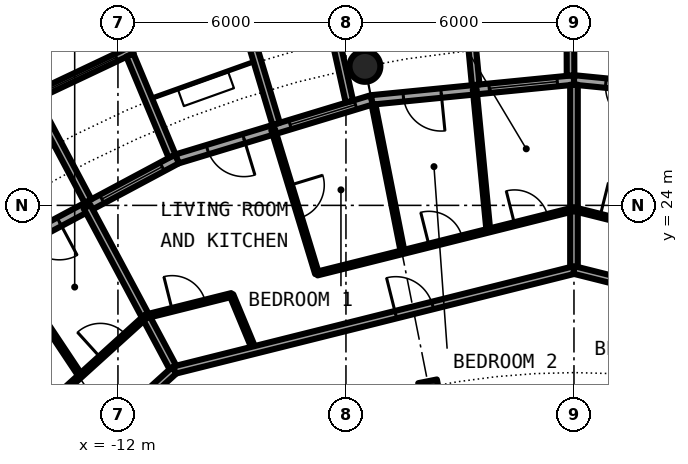
"""IFC4 building model, lengths in metres.
Left out: names, types, materials, properties, quantities, classifications, styles, units other than length and angle.
Written with IfcOpenShell. Run it as: python <this file> out.ifc"""

import sys

from ifc_helpers import new_model, si_unit, direction, frame, frame_2d, origin, origin_2d, place, context, subcontext, project, spatial, rectangle, circle, hollow_circle, i_section, extrude, element, fill, save


model = new_model("IFC4")
c1 = context("Model", 3, precision=1e-05, world=origin(), true_north=direction((0.0, 1.0)))
c2 = subcontext(c1, "Body", "Model", "MODEL_VIEW")
j1 = project(units=[si_unit("LENGTHUNIT", "METRE"), si_unit("PLANEANGLEUNIT", "RADIAN")], contexts=[c1])
p1 = place(None, origin())
s1 = spatial("IfcSite", under=j1, at=p1, CompositionType="ELEMENT")
p2 = place(p1, origin())
s2 = spatial("IfcBuilding", under=s1, at=p2, CompositionType="ELEMENT")
p3 = place(p2, frame((0.0, 0.0, 161.6)))
s3 = spatial("IfcBuildingStorey", under=s2, at=p3, CompositionType="ELEMENT", Elevation=161.6)
p4 = place(p3, frame((-5.501, 27.658, 0.0), z_axis=(0.0, 0.0, 1.0), x_axis=(1.0, 0.0, 0.0)))
e1 = element("IfcColumn", 1, at=p4, inside=s3, PredefinedType="COLUMN", context=c2, shape_type="SweptSolid", body=[
    extrude(hollow_circle(Radius=0.406, WallThickness=0.04, at=origin_2d()), origin(), (0.0, 0.0, 1.0), 3.05),
])
p5 = place(p3, frame((-3.824, 19.223, 0.0), z_axis=(0.0, 0.0, 1.0), x_axis=(-0.195090322016, 0.980785280403, 0.0)))
e2 = element("IfcColumn", 2, at=p5, inside=s3, PredefinedType="COLUMN", context=c2, shape_type="SweptSolid", body=[
    extrude(i_section(OverallWidth=0.3, OverallDepth=0.5, WebThickness=0.014, FlangeThickness=0.028, FilletRadius=0.027, at=origin_2d()), origin(), (0.0, 0.0, 1.0), 3.05),
])
p6 = place(p3, frame((5.326, 26.775, 0.0), z_axis=(0.0, 0.0, 1.0), x_axis=(-0.995173996315, 0.098126026407, 0.0)))
e3 = element("IfcWall", 3, at=p6, inside=s3, PredefinedType="SOLIDWALL", context=c2, shape_type="SweptSolid", body=[
    extrude(rectangle(XDim=5.352, YDim=0.25, at=frame_2d((2.676, 0.0))), origin(), (0.0, 0.0, 1.0), 2.7),
])
p7 = place(p6, frame((0.441, 0.0, 0.3)))
e4 = element("IfcOpeningElement", 4, at=p7, cuts=e3, PredefinedType="OPENING", context=c2, shape_type="SweptSolid", body=[
    extrude(rectangle(XDim=1.8, YDim=2.1, at=frame_2d((0.9, 1.05))), frame((0.0, 0.135, 0.0), z_axis=(0.0, -1.0, 0.0), x_axis=(1.0, 0.0, 0.0)), (0.0, 0.0, 1.0), 0.27),
])
p8 = place(p6, frame((3.51, 0.0, 0.0)))
e5 = element("IfcOpeningElement", 5, at=p8, cuts=e3, PredefinedType="OPENING", context=c2, shape_type="SweptSolid", body=[
    extrude(rectangle(XDim=1.0, YDim=2.2, at=frame_2d((0.5, 1.1))), frame((0.0, 0.135, 0.0), z_axis=(0.0, -1.0, 0.0), x_axis=(1.0, 0.0, 0.0)), (0.0, 0.0, 1.0), 0.27),
])
p9 = place(p3, frame((0.0, 27.3, 0.0), z_axis=(0.0, 0.0, 1.0), x_axis=(-0.995173996315, -0.098126026407, 0.0)))
e6 = element("IfcWall", 6, at=p9, inside=s3, PredefinedType="SOLIDWALL", context=c2, shape_type="SweptSolid", body=[
    extrude(rectangle(XDim=5.352, YDim=0.25, at=frame_2d((2.676, 0.0))), origin(), (0.0, 0.0, 1.0), 2.7),
])
p10 = place(p9, frame((0.441, 0.0, 0.3)))
e7 = element("IfcOpeningElement", 7, at=p10, cuts=e6, PredefinedType="OPENING", context=c2, shape_type="SweptSolid", body=[
    extrude(rectangle(XDim=1.8, YDim=2.1, at=frame_2d((0.9, 1.05))), frame((0.0, 0.135, 0.0), z_axis=(0.0, -1.0, 0.0), x_axis=(1.0, 0.0, 0.0)), (0.0, 0.0, 1.0), 0.27),
])
p11 = place(p9, frame((3.51, 0.0, 0.0)))
e8 = element("IfcOpeningElement", 8, at=p11, cuts=e6, PredefinedType="OPENING", context=c2, shape_type="SweptSolid", body=[
    extrude(rectangle(XDim=1.0, YDim=2.2, at=frame_2d((0.5, 1.1))), frame((0.0, 0.135, 0.0), z_axis=(0.0, -1.0, 0.0), x_axis=(1.0, 0.0, 0.0)), (0.0, 0.0, 1.0), 0.27),
])
p12 = place(p3, frame((-0.09, 27.417, -0.03), z_axis=(0.0, 0.0, 1.0), x_axis=(-0.00347308367, 0.999993968827, 0.0)))
e9 = element("IfcWall", 9, at=p12, inside=s3, PredefinedType="SOLIDWALL", context=c2, shape_type="SweptSolid", body=[
    extrude(rectangle(XDim=2.882, YDim=0.2, at=frame_2d((1.441, 0.0))), origin(), (0.0, 0.0, 1.0), 2.73),
])
p13 = place(p3, frame((-2.586, 27.171, -0.03), z_axis=(0.0, 0.0, 1.0), x_axis=(-0.094548432284, 0.995520262954, 0.0)))
e10 = element("IfcWall", 10, at=p13, inside=s3, PredefinedType="SOLIDWALL", context=c2, shape_type="SweptSolid", body=[
    extrude(rectangle(XDim=3.006, YDim=0.2, at=frame_2d((1.503, 0.0))), origin(), (0.0, 0.0, 1.0), 2.73),
])
p14 = place(p3, frame((-5.326, 26.775, 0.0), z_axis=(0.0, 0.0, 1.0), x_axis=(-0.956965678721, -0.290201119486, 0.0)))
e11 = element("IfcWall", 11, at=p14, inside=s3, PredefinedType="SOLIDWALL", context=c2, shape_type="SweptSolid", body=[
    extrude(rectangle(XDim=5.351, YDim=0.25, at=frame_2d((2.676, 0.0))), origin(), (0.0, 0.0, 1.0), 2.7),
])
p15 = place(p14, frame((0.441, 0.0, 0.3)))
e12 = element("IfcOpeningElement", 12, at=p15, cuts=e11, PredefinedType="OPENING", context=c2, shape_type="SweptSolid", body=[
    extrude(rectangle(XDim=1.8, YDim=2.1, at=frame_2d((0.9, 1.05))), frame((0.0, 0.135, 0.0), z_axis=(0.0, -1.0, 0.0), x_axis=(1.0, 0.0, 0.0)), (0.0, 0.0, 1.0), 0.27),
])
p16 = place(p14, frame((3.51, 0.0, 0.0)))
e13 = element("IfcOpeningElement", 13, at=p16, cuts=e11, PredefinedType="OPENING", context=c2, shape_type="SweptSolid", body=[
    extrude(rectangle(XDim=1.0, YDim=2.2, at=frame_2d((0.5, 1.1))), frame((0.0, 0.135, 0.0), z_axis=(0.0, -1.0, 0.0), x_axis=(1.0, 0.0, 0.0)), (0.0, 0.0, 1.0), 0.27),
])
p17 = place(p3, frame((-5.909, 26.729, -0.03), z_axis=(0.0, 0.0, 1.0), x_axis=(-0.216409053917, 0.976302781612, 0.0)))
e14 = element("IfcWall", 14, at=p17, inside=s3, PredefinedType="SOLIDWALL", context=c2, shape_type="SweptSolid", body=[
    extrude(rectangle(XDim=2.925, YDim=0.2, at=frame_2d((1.463, 0.0))), origin(), (0.0, 0.0, 1.0), 2.73),
])
p18 = place(p3, frame((-7.837, 26.144, -0.03), z_axis=(0.0, 0.0, 1.0), x_axis=(-0.287064767992, 0.957911174889, 0.0)))
e15 = element("IfcWall", 15, at=p18, inside=s3, PredefinedType="SOLIDWALL", context=c2, shape_type="SweptSolid", body=[
    extrude(rectangle(XDim=3.006, YDim=0.2, at=frame_2d((1.503, 0.0))), origin(), (0.0, 0.0, 1.0), 2.73),
])
p19 = place(p3, frame((-10.447, 25.222, 0.0), z_axis=(0.0, 0.0, 1.0), x_axis=(-0.881915646801, -0.471407246368, 0.0)))
e16 = element("IfcWall", 16, at=p19, inside=s3, PredefinedType="SOLIDWALL", context=c2, shape_type="SweptSolid", body=[
    extrude(rectangle(XDim=5.352, YDim=0.25, at=frame_2d((2.676, 0.0))), origin(), (0.0, 0.0, 1.0), 2.7),
])
p20 = place(p19, frame((0.441, 0.0, 0.3)))
e17 = element("IfcOpeningElement", 17, at=p20, cuts=e16, PredefinedType="OPENING", context=c2, shape_type="SweptSolid", body=[
    extrude(rectangle(XDim=1.8, YDim=2.1, at=frame_2d((0.9, 1.05))), frame((0.0, 0.135, 0.0), z_axis=(0.0, -1.0, 0.0), x_axis=(1.0, 0.0, 0.0)), (0.0, 0.0, 1.0), 0.27),
])
p21 = place(p19, frame((3.51, 0.0, 0.0)))
e18 = element("IfcOpeningElement", 18, at=p21, cuts=e16, PredefinedType="OPENING", context=c2, shape_type="SweptSolid", body=[
    extrude(rectangle(XDim=1.0, YDim=2.2, at=frame_2d((0.5, 1.1))), frame((0.0, 0.135, 0.0), z_axis=(0.0, -1.0, 0.0), x_axis=(1.0, 0.0, 0.0)), (0.0, 0.0, 1.0), 0.27),
])
p22 = place(p3, frame((-11.629, 28.088, -0.03), z_axis=(0.0, 0.0, 1.0), x_axis=(-0.904000060331, -0.427532327342, 0.0)))
e19 = element("IfcWall", 19, at=p22, inside=s3, PredefinedType="SOLIDWALL", context=c2, shape_type="SweptSolid", body=[
    extrude(rectangle(XDim=2.993, YDim=0.2, at=frame_2d((1.497, 0.0))), origin(), (0.0, 0.0, 1.0), 2.73),
])
p23 = place(p22, frame((0.457, 0.0, 0.33)))
e20 = element("IfcOpeningElement", 20, at=p23, cuts=e19, PredefinedType="OPENING", context=c2, shape_type="SweptSolid", body=[
    extrude(circle(Radius=1.04, at=frame_2d((1.04, 1.04))), frame((0.0, 0.11, 0.0), z_axis=(0.0, -1.0, 0.0), x_axis=(1.0, 0.0, 0.0)), (0.0, 0.0, 1.0), 0.22),
])
p24 = place(p3, frame((-10.575, 25.295, -0.03), z_axis=(0.0, 0.0, 1.0), x_axis=(-0.385697364644, 0.922625353492, 0.0)))
e21 = element("IfcWall", 21, at=p24, inside=s3, PredefinedType="SOLIDWALL", context=c2, shape_type="SweptSolid", body=[
    extrude(rectangle(XDim=2.883, YDim=0.2, at=frame_2d((1.442, 0.0))), origin(), (0.0, 0.0, 1.0), 2.73),
])
p25 = place(p3, frame((-12.787, 24.113, -0.03), z_axis=(0.0, 0.0, 1.0), x_axis=(-0.468365282436, 0.883534924159, 0.0)))
e22 = element("IfcWall", 22, at=p25, inside=s3, PredefinedType="SOLIDWALL", context=c2, shape_type="SweptSolid", body=[
    extrude(rectangle(XDim=3.006, YDim=0.2, at=frame_2d((1.503, 0.0))), origin(), (0.0, 0.0, 1.0), 2.73),
])
p26 = place(p3, frame((-9.013, 21.642, 0.0), z_axis=(0.0, 0.0, 1.0), x_axis=(0.384228756538, -0.923237923099, 0.0)))
e23 = element("IfcWall", 23, at=p26, inside=s3, PredefinedType="PARTITIONING", context=c2, shape_type="SweptSolid", body=[
    extrude(rectangle(XDim=1.569, YDim=0.1, at=frame_2d((0.785, 0.0))), origin(), (0.0, 0.0, 1.0), 2.7),
])
p27 = place(p3, frame((-15.054, 22.624, 0.0), z_axis=(0.0, 0.0, 1.0), x_axis=(0.553823887887, -0.83263383381, 0.0)))
e24 = element("IfcWall", 24, at=p27, inside=s3, PredefinedType="PARTITIONING", context=c2, shape_type="SweptSolid", body=[
    extrude(rectangle(XDim=3.73, YDim=0.1, at=frame_2d((1.865, 0.0))), origin(), (0.0, 0.0, 1.0), 2.7),
])
p28 = place(p3, frame((-12.814, 23.964, 0.0), z_axis=(0.0, 0.0, 1.0), x_axis=(0.471388689095, -0.881925565903, 0.0)))
e25 = element("IfcWall", 25, at=p28, inside=s3, PredefinedType="PARTITIONING", context=c2, shape_type="SweptSolid", body=[
    extrude(rectangle(XDim=4.875, YDim=0.2, at=frame_2d((2.438, 0.0))), origin(), (0.0, 0.0, 1.0), 2.7),
])
p29 = place(p3, frame((-7.917, 25.996, 0.0), z_axis=(0.0, 0.0, 1.0), x_axis=(0.291291575636, -0.956634317785, 0.0)))
e26 = element("IfcWall", 26, at=p29, inside=s3, PredefinedType="PARTITIONING", context=c2, shape_type="SweptSolid", body=[
    extrude(rectangle(XDim=3.962, YDim=0.1, at=frame_2d((1.981, 0.0))), origin(), (0.0, 0.0, 1.0), 2.7),
])
p30 = place(p29, frame((1.531, 0.0, 0.0)))
e27 = element("IfcOpeningElement", 27, at=p30, cuts=e26, PredefinedType="OPENING", context=c2, shape_type="SweptSolid", body=[
    extrude(rectangle(XDim=0.9, YDim=2.3, at=frame_2d((0.45, 1.15))), frame((0.0, 0.06, 0.0), z_axis=(0.0, -1.0, 0.0), x_axis=(1.0, 0.0, 0.0)), (0.0, 0.0, 1.0), 0.12),
])
p31 = place(p3, frame((-5.276, 26.658, 0.0), z_axis=(0.0, 0.0, 1.0), x_axis=(0.194030211642, -0.980995554001, 0.0)))
e28 = element("IfcWall", 28, at=p31, inside=s3, PredefinedType="PARTITIONING", context=c2, shape_type="SweptSolid", body=[
    extrude(rectangle(XDim=3.962, YDim=0.1, at=frame_2d((1.981, 0.0))), origin(), (0.0, 0.0, 1.0), 2.7),
])
p32 = place(p3, frame((-2.612, 27.049, 0.0), z_axis=(0.0, 0.0, 1.0), x_axis=(0.09626981452, -0.995355274669, 0.0)))
e29 = element("IfcWall", 29, at=p32, inside=s3, PredefinedType="PARTITIONING", context=c2, shape_type="SweptSolid", body=[
    extrude(rectangle(XDim=3.73, YDim=0.1, at=frame_2d((1.865, 0.0))), origin(), (0.0, 0.0, 1.0), 2.7),
])
p33 = place(p3, frame((0.0, 22.3, 0.0), z_axis=(0.0, 0.0, 1.0), x_axis=(0.0, 1.0, 0.0)))
e30 = element("IfcWall", 30, at=p33, inside=s3, PredefinedType="PARTITIONING", context=c2, shape_type="SweptSolid", body=[
    extrude(rectangle(XDim=4.875, YDim=0.2, at=frame_2d((2.438, 0.0))), origin(), (0.0, 0.0, 1.0), 2.7),
])
p34 = place(p3, frame((-18.542, 12.389, 0.0), z_axis=(0.0, 0.0, 1.0), x_axis=(0.740947367223, 0.671563101283, 0.0)))
e31 = element("IfcWall", 31, at=p34, inside=s3, PredefinedType="PARTITIONING", context=c2, shape_type="SweptSolid", body=[
    extrude(rectangle(XDim=10.837, YDim=0.2, at=frame_2d((5.419, 0.0))), origin(), (0.0, 0.0, 1.0), 2.7),
])
p35 = place(p34, frame((6.002, 0.0, 0.0)))
e32 = element("IfcOpeningElement", 32, at=p35, cuts=e31, PredefinedType="OPENING", context=c2, shape_type="SweptSolid", body=[
    extrude(rectangle(XDim=1.0, YDim=2.3, at=frame_2d((0.5, 1.15))), frame((0.0, 0.11, 0.0), z_axis=(0.0, -1.0, 0.0), x_axis=(1.0, 0.0, 0.0)), (0.0, 0.0, 1.0), 0.22),
])
p36 = place(p3, frame((-10.512, 19.667, 0.0), z_axis=(0.0, 0.0, 1.0), x_axis=(0.970086843848, 0.242758141765, 0.0)))
e33 = element("IfcWall", 33, at=p36, inside=s3, PredefinedType="PARTITIONING", context=c2, shape_type="SweptSolid", body=[
    extrude(rectangle(XDim=10.842, YDim=0.2, at=frame_2d((5.421, 0.0))), origin(), (0.0, 0.0, 1.0), 2.7),
])
p37 = place(p36, frame((6.002, 0.0, 0.0)))
e34 = element("IfcOpeningElement", 34, at=p37, cuts=e33, PredefinedType="OPENING", context=c2, shape_type="SweptSolid", body=[
    extrude(rectangle(XDim=1.0, YDim=2.3, at=frame_2d((0.5, 1.15))), frame((0.0, 0.11, 0.0), z_axis=(0.0, -1.0, 0.0), x_axis=(1.0, 0.0, 0.0)), (0.0, 0.0, 1.0), 0.22),
])
p38 = place(p3, frame((0.0, 22.3, 0.0), z_axis=(0.0, 0.0, 1.0), x_axis=(0.969975381822, -0.243203122222, 0.0)))
e35 = element("IfcWall", 35, at=p38, inside=s3, PredefinedType="PARTITIONING", context=c2, shape_type="SweptSolid", body=[
    extrude(rectangle(XDim=10.843, YDim=0.2, at=frame_2d((5.421, 0.0))), origin(), (0.0, 0.0, 1.0), 2.7),
])
p39 = place(p38, frame((6.002, 0.0, 0.0)))
e36 = element("IfcOpeningElement", 36, at=p39, cuts=e35, PredefinedType="OPENING", context=c2, shape_type="SweptSolid", body=[
    extrude(rectangle(XDim=1.0, YDim=2.3, at=frame_2d((0.5, 1.15))), frame((0.0, 0.11, 0.0), z_axis=(0.0, -1.0, 0.0), x_axis=(1.0, 0.0, 0.0)), (0.0, 0.0, 1.0), 0.22),
])
p40 = place(p3, frame((-16.43, 16.398, 0.0), z_axis=(0.0, 0.0, 1.0), x_axis=(0.740990766872, 0.671515214578, 0.0)))
e37 = element("IfcWall", 37, at=p40, inside=s3, PredefinedType="PARTITIONING", context=c2, shape_type="SweptSolid", body=[
    extrude(rectangle(XDim=6.965, YDim=0.1, at=frame_2d((3.482, 0.0))), origin(), (0.0, 0.0, 1.0), 2.7),
])
p41 = place(p40, frame((3.035, 0.0, 0.0)))
e38 = element("IfcOpeningElement", 38, at=p41, cuts=e37, PredefinedType="OPENING", context=c2, shape_type="SweptSolid", body=[
    extrude(rectangle(XDim=0.9, YDim=2.3, at=frame_2d((0.45, 1.15))), frame((0.0, 0.06, 0.0), z_axis=(0.0, -1.0, 0.0), x_axis=(1.0, 0.0, 0.0)), (0.0, 0.0, 1.0), 0.12),
])
p42 = place(p40, frame((5.357, 0.0, 0.0)))
e39 = element("IfcOpeningElement", 39, at=p42, cuts=e37, PredefinedType="OPENING", context=c2, shape_type="SweptSolid", body=[
    extrude(rectangle(XDim=0.9, YDim=2.3, at=frame_2d((0.45, 1.15))), frame((0.0, 0.06, 0.0), z_axis=(0.0, -1.0, 0.0), x_axis=(1.0, 0.0, 0.0)), (0.0, 0.0, 1.0), 0.12),
])
p43 = place(p3, frame((-11.266, 21.078, 0.0), z_axis=(0.0, 0.0, 1.0), x_axis=(0.970074595874, 0.242807080706, 0.0)))
e40 = element("IfcWall", 40, at=p43, inside=s3, PredefinedType="PARTITIONING", context=c2, shape_type="SweptSolid", body=[
    extrude(rectangle(XDim=2.328, YDim=0.1, at=frame_2d((1.164, 0.0))), origin(), (0.0, 0.0, 1.0), 2.7),
])
p44 = place(p43, frame((0.714, 0.0, 0.0)))
e41 = element("IfcOpeningElement", 41, at=p44, cuts=e40, PredefinedType="OPENING", context=c2, shape_type="SweptSolid", body=[
    extrude(rectangle(XDim=0.9, YDim=2.3, at=frame_2d((0.45, 1.15))), frame((0.0, 0.06, 0.0), z_axis=(0.0, -1.0, 0.0), x_axis=(1.0, 0.0, 0.0)), (0.0, 0.0, 1.0), 0.12),
])
p45 = place(p3, frame((-6.76, 22.206, 0.0), z_axis=(0.0, 0.0, 1.0), x_axis=(0.970070358667, 0.242824008772, 0.0)))
e42 = element("IfcWall", 42, at=p45, inside=s3, PredefinedType="PARTITIONING", context=c2, shape_type="SweptSolid", body=[
    extrude(rectangle(XDim=6.972, YDim=0.1, at=frame_2d((3.486, 0.0))), origin(), (0.0, 0.0, 1.0), 2.7),
])
p46 = place(p45, frame((3.037, 0.0, 0.0)))
e43 = element("IfcOpeningElement", 43, at=p46, cuts=e42, PredefinedType="OPENING", context=c2, shape_type="SweptSolid", body=[
    extrude(rectangle(XDim=0.9, YDim=2.3, at=frame_2d((0.45, 1.15))), frame((0.0, 0.06, 0.0), z_axis=(0.0, -1.0, 0.0), x_axis=(1.0, 0.0, 0.0)), (0.0, 0.0, 1.0), 0.12),
])
p47 = place(p45, frame((5.357, 0.0, 0.0)))
e44 = element("IfcOpeningElement", 44, at=p47, cuts=e42, PredefinedType="OPENING", context=c2, shape_type="SweptSolid", body=[
    extrude(rectangle(XDim=0.9, YDim=2.3, at=frame_2d((0.45, 1.15))), frame((0.0, 0.06, 0.0), z_axis=(0.0, -1.0, 0.0), x_axis=(1.0, 0.0, 0.0)), (0.0, 0.0, 1.0), 0.12),
])
p48 = place(p3, frame((0.003, 23.899, 0.0), z_axis=(0.0, 0.0, 1.0), x_axis=(0.970074448647, -0.242807668911, 0.0)))
e45 = element("IfcWall", 45, at=p48, inside=s3, PredefinedType="PARTITIONING", context=c2, shape_type="SweptSolid", body=[
    extrude(rectangle(XDim=2.323, YDim=0.1, at=frame_2d((1.161, 0.0))), origin(), (0.0, 0.0, 1.0), 2.7),
])
p49 = place(p48, frame((0.708, 0.0, 0.0)))
e46 = element("IfcOpeningElement", 46, at=p49, cuts=e45, PredefinedType="OPENING", context=c2, shape_type="SweptSolid", body=[
    extrude(rectangle(XDim=0.9, YDim=2.3, at=frame_2d((0.45, 1.15))), frame((0.0, 0.06, 0.0), z_axis=(0.0, -1.0, 0.0), x_axis=(1.0, 0.0, 0.0)), (0.0, 0.0, 1.0), 0.12),
])
p50 = place(p8, origin())
e47 = element("IfcDoor", 47, at=p50, inside=s3, OperationType="SINGLE_SWING_LEFT", PredefinedType="DOOR", context=c2, shape_type="SweptSolid", body=[
    extrude(rectangle(XDim=1.0, YDim=2.2, at=frame_2d((0.5, 1.1))), frame((0.0, 0.025, 0.0), z_axis=(0.0, -1.0, 0.0), x_axis=(1.0, 0.0, 0.0)), (0.0, 0.0, 1.0), 0.05),
])
fill(e5, e47)
p51 = place(p10, origin())
e48 = element("IfcWindow", 48, at=p51, inside=s3, PartitioningType="SINGLE_PANEL", PredefinedType="WINDOW", context=c2, shape_type="SweptSolid", body=[
    extrude(rectangle(XDim=1.8, YDim=2.1, at=frame_2d((0.9, 1.05))), frame((0.0, 0.03, 0.0), z_axis=(0.0, -1.0, 0.0), x_axis=(1.0, 0.0, 0.0)), (0.0, 0.0, 1.0), 0.06),
])
fill(e7, e48)
p52 = place(p11, origin())
e49 = element("IfcDoor", 49, at=p52, inside=s3, OperationType="SINGLE_SWING_LEFT", PredefinedType="DOOR", context=c2, shape_type="SweptSolid", body=[
    extrude(rectangle(XDim=1.0, YDim=2.2, at=frame_2d((0.5, 1.1))), frame((0.0, 0.025, 0.0), z_axis=(0.0, -1.0, 0.0), x_axis=(1.0, 0.0, 0.0)), (0.0, 0.0, 1.0), 0.05),
])
fill(e8, e49)
p53 = place(p15, origin())
e50 = element("IfcWindow", 50, at=p53, inside=s3, PartitioningType="SINGLE_PANEL", PredefinedType="WINDOW", context=c2, shape_type="SweptSolid", body=[
    extrude(rectangle(XDim=1.8, YDim=2.1, at=frame_2d((0.9, 1.05))), frame((0.0, 0.03, 0.0), z_axis=(0.0, -1.0, 0.0), x_axis=(1.0, 0.0, 0.0)), (0.0, 0.0, 1.0), 0.06),
])
fill(e12, e50)
p54 = place(p16, origin())
e51 = element("IfcDoor", 51, at=p54, inside=s3, OperationType="SINGLE_SWING_LEFT", PredefinedType="DOOR", context=c2, shape_type="SweptSolid", body=[
    extrude(rectangle(XDim=1.0, YDim=2.2, at=frame_2d((0.5, 1.1))), frame((0.0, 0.025, 0.0), z_axis=(0.0, -1.0, 0.0), x_axis=(1.0, 0.0, 0.0)), (0.0, 0.0, 1.0), 0.05),
])
fill(e13, e51)
p55 = place(p20, origin())
e52 = element("IfcWindow", 52, at=p55, inside=s3, PartitioningType="SINGLE_PANEL", PredefinedType="WINDOW", context=c2, shape_type="SweptSolid", body=[
    extrude(rectangle(XDim=1.8, YDim=2.1, at=frame_2d((0.9, 1.05))), frame((0.0, 0.03, 0.0), z_axis=(0.0, -1.0, 0.0), x_axis=(1.0, 0.0, 0.0)), (0.0, 0.0, 1.0), 0.06),
])
fill(e17, e52)
p56 = place(p23, origin())
e53 = element("IfcWindow", 53, at=p56, inside=s3, PartitioningType="SINGLE_PANEL", PredefinedType="WINDOW", context=c2, shape_type="SweptSolid", body=[
    extrude(circle(Radius=1.04, at=frame_2d((1.04, 1.04))), frame((0.0, 0.03, 0.0), z_axis=(0.0, -1.0, 0.0), x_axis=(1.0, 0.0, 0.0)), (0.0, 0.0, 1.0), 0.06),
])
fill(e20, e53)
p57 = place(p21, origin())
e54 = element("IfcDoor", 54, at=p57, inside=s3, OperationType="SINGLE_SWING_LEFT", PredefinedType="DOOR", context=c2, shape_type="SweptSolid", body=[
    extrude(rectangle(XDim=1.0, YDim=2.2, at=frame_2d((0.5, 1.1))), frame((0.0, 0.025, 0.0), z_axis=(0.0, -1.0, 0.0), x_axis=(1.0, 0.0, 0.0)), (0.0, 0.0, 1.0), 0.05),
])
fill(e18, e54)
p58 = place(p49, origin())
e55 = element("IfcDoor", 55, at=p58, inside=s3, OperationType="SINGLE_SWING_LEFT", PredefinedType="DOOR", context=c2, shape_type="SweptSolid", body=[
    extrude(rectangle(XDim=0.9, YDim=2.3, at=frame_2d((0.45, 1.15))), frame((0.0, 0.025, 0.0), z_axis=(0.0, -1.0, 0.0), x_axis=(1.0, 0.0, 0.0)), (0.0, 0.0, 1.0), 0.05),
])
fill(e46, e55)
p59 = place(p37, origin())
e56 = element("IfcDoor", 56, at=p59, inside=s3, OperationType="SINGLE_SWING_RIGHT", PredefinedType="DOOR", context=c2, shape_type="SweptSolid", body=[
    extrude(rectangle(XDim=1.0, YDim=2.3, at=frame_2d((0.5, 1.15))), frame((0.0, 0.025, 0.0), z_axis=(0.0, -1.0, 0.0), x_axis=(1.0, 0.0, 0.0)), (0.0, 0.0, 1.0), 0.05),
])
fill(e34, e56)
p60 = place(p44, origin())
e57 = element("IfcDoor", 57, at=p60, inside=s3, OperationType="SINGLE_SWING_RIGHT", PredefinedType="DOOR", context=c2, shape_type="SweptSolid", body=[
    extrude(rectangle(XDim=0.9, YDim=2.3, at=frame_2d((0.45, 1.15))), frame((0.0, 0.025, 0.0), z_axis=(0.0, -1.0, 0.0), x_axis=(1.0, 0.0, 0.0)), (0.0, 0.0, 1.0), 0.05),
])
fill(e41, e57)
p61 = place(p30, origin())
e58 = element("IfcDoor", 58, at=p61, inside=s3, OperationType="SINGLE_SWING_LEFT", PredefinedType="DOOR", context=c2, shape_type="SweptSolid", body=[
    extrude(rectangle(XDim=0.9, YDim=2.3, at=frame_2d((0.45, 1.15))), frame((0.0, 0.025, 0.0), z_axis=(0.0, -1.0, 0.0), x_axis=(1.0, 0.0, 0.0)), (0.0, 0.0, 1.0), 0.05),
])
fill(e27, e58)
p62 = place(p46, origin())
e59 = element("IfcDoor", 59, at=p62, inside=s3, OperationType="SINGLE_SWING_RIGHT", PredefinedType="DOOR", context=c2, shape_type="SweptSolid", body=[
    extrude(rectangle(XDim=0.9, YDim=2.3, at=frame_2d((0.45, 1.15))), frame((0.0, 0.025, 0.0), z_axis=(0.0, -1.0, 0.0), x_axis=(1.0, 0.0, 0.0)), (0.0, 0.0, 1.0), 0.05),
])
fill(e43, e59)
p63 = place(p47, origin())
e60 = element("IfcDoor", 60, at=p63, inside=s3, OperationType="SINGLE_SWING_RIGHT", PredefinedType="DOOR", context=c2, shape_type="SweptSolid", body=[
    extrude(rectangle(XDim=0.9, YDim=2.3, at=frame_2d((0.45, 1.15))), frame((0.0, 0.025, 0.0), z_axis=(0.0, -1.0, 0.0), x_axis=(1.0, 0.0, 0.0)), (0.0, 0.0, 1.0), 0.05),
])
fill(e44, e60)
p64 = place(p42, origin())
e61 = element("IfcDoor", 61, at=p64, inside=s3, OperationType="SINGLE_SWING_RIGHT", PredefinedType="DOOR", context=c2, shape_type="SweptSolid", body=[
    extrude(rectangle(XDim=0.9, YDim=2.3, at=frame_2d((0.45, 1.15))), frame((0.0, 0.025, 0.0), z_axis=(0.0, -1.0, 0.0), x_axis=(1.0, 0.0, 0.0)), (0.0, 0.0, 1.0), 0.05),
])
fill(e39, e61)
save(model, sys.argv[1])
